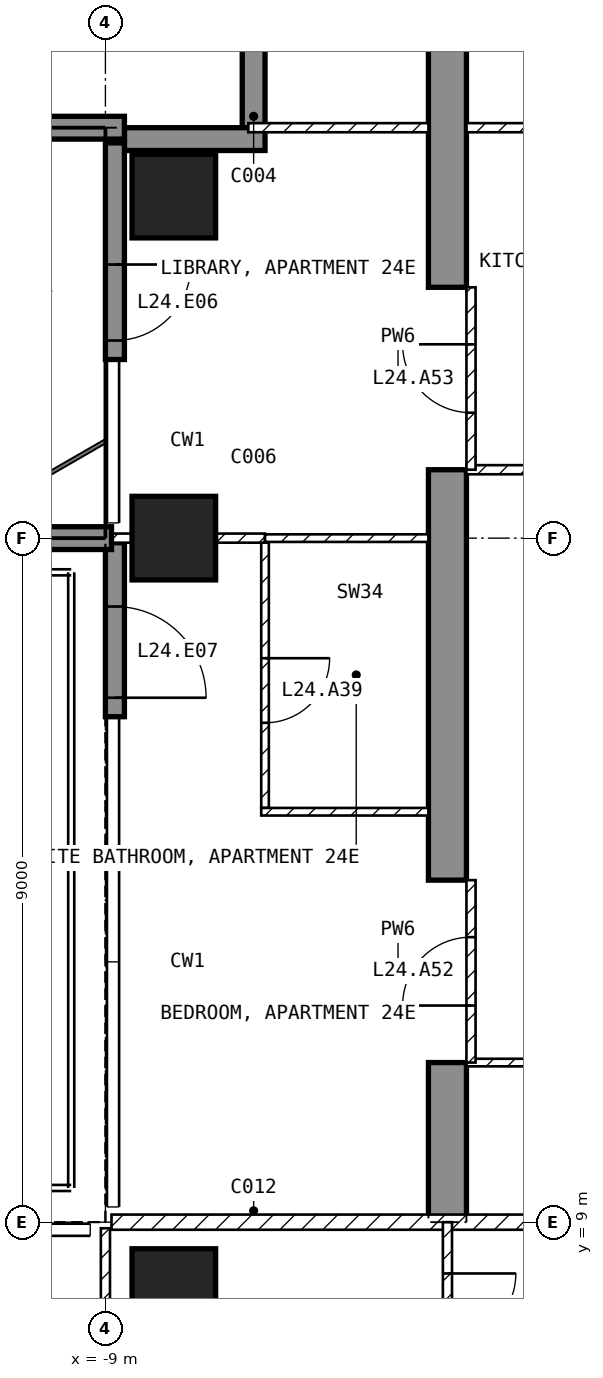
"""IFC4 building model, lengths in metres.
Left out: names, types, materials, properties, quantities, classifications, styles, units other than length and angle.
Written with IfcOpenShell. Run it as: python <this file> out.ifc"""

import sys

from ifc_helpers import new_model, si_unit, direction, frame, frame_2d, origin, origin_2d, place, context, subcontext, project, spatial, polyline, rectangle, outline, extrude, element, fill, save


model = new_model("IFC4")
c1 = context("Model", 3, precision=1e-05, world=origin(), true_north=direction((0.0, 1.0)))
c2 = subcontext(c1, "Body", "Model", "MODEL_VIEW")
j1 = project(units=[si_unit("LENGTHUNIT", "METRE"), si_unit("PLANEANGLEUNIT", "RADIAN")], contexts=[c1])
p1 = place(None, origin())
s1 = spatial("IfcSite", under=j1, at=p1, CompositionType="ELEMENT")
p2 = place(p1, origin())
s2 = spatial("IfcBuilding", under=s1, at=p2, CompositionType="ELEMENT")
p3 = place(p2, frame((0.0, 0.0, 105.9)))
s3 = spatial("IfcBuildingStorey", under=s2, at=p3, CompositionType="ELEMENT", Elevation=105.9)
for number, where, z_axis, x_axis in (
    (1, (-8.1, 8.1, -0.25), (0.0, 0.0, 1.0), (1.0, 0.0, 0.0)),
    (2, (-8.1, 18.0, -0.25), (0.0, 0.0, 1.0), (1.0, 0.0, 0.0)),
    (3, (-8.1, 22.5, -0.25), (0.0, 0.0, 1.0), (1.0, 0.0, 0.0)),
):
    element("IfcColumn", number, at=place(p3, frame(where, z_axis=z_axis, x_axis=x_axis)), inside=s3, PredefinedType="COLUMN", context=c2, shape_type="SweptSolid", body=[
        extrude(rectangle(XDim=1.1, YDim=1.1, at=origin_2d()), origin(), (0.0, 0.0, 1.0), 3.5),
    ])
p4 = place(p3, frame((-4.75, 9.0, -0.25), z_axis=(1.0, 0.0, 0.0), x_axis=(0.0, 1.0, 0.0)))
e4 = element("IfcWall", 4, at=p4, inside=s3, PredefinedType="SHEAR", context=c2, shape_type="SweptSolid", body=[
    extrude(outline(polyline([(0.0, 0.0), (2.1, 0.0), (2.1, 2.65), (4.5, 2.65), (4.5, 0.0), (9.9, 0.0), (9.9, 2.65), (12.3, 2.65), (12.3, 0.0), (16.55, 0.0), (16.55, 3.5), (0.0, 3.5), (0.0, 0.0)])), origin(), (0.0, 0.0, 1.0), 0.5),
])
p5 = place(p3, frame((-8.875, 23.2, 0.0), z_axis=(0.0, 0.0, 1.0), x_axis=(0.0, -1.0, 0.0)))
e5 = element("IfcWall", 5, at=p5, inside=s3, PredefinedType="SOLIDWALL", context=c2, shape_type="SweptSolid", body=[
    extrude(rectangle(XDim=2.85, YDim=0.25, at=frame_2d((1.425, 0.0))), origin(), (0.0, 0.0, 1.0), 3.25),
])
p6 = place(p5, frame((1.6, 0.0, 0.0)))
e6 = element("IfcOpeningElement", 6, at=p6, cuts=e5, PredefinedType="OPENING", context=c2, shape_type="SweptSolid", body=[
    extrude(rectangle(XDim=1.0, YDim=2.4, at=frame_2d((0.5, 1.2))), frame((0.0, 0.135, 0.0), z_axis=(0.0, -1.0, 0.0), x_axis=(1.0, 0.0, 0.0)), (0.0, 0.0, 1.0), 0.27),
])
p7 = place(p3, frame((-8.875, 17.94, 0.0), z_axis=(0.0, 0.0, 1.0), x_axis=(0.0, -1.0, 0.0)))
e7 = element("IfcWall", 7, at=p7, inside=s3, PredefinedType="SOLIDWALL", context=c2, shape_type="SweptSolid", body=[
    extrude(rectangle(XDim=2.29, YDim=0.25, at=frame_2d((1.145, 0.0))), origin(), (0.0, 0.0, 1.0), 3.25),
])
p8 = place(p7, frame((0.84, 0.0, 0.0)))
e8 = element("IfcOpeningElement", 8, at=p8, cuts=e7, PredefinedType="OPENING", context=c2, shape_type="SweptSolid", body=[
    extrude(rectangle(XDim=1.2, YDim=2.4, at=frame_2d((0.6, 1.2))), frame((0.0, 0.135, 0.0), z_axis=(0.0, -1.0, 0.0), x_axis=(1.0, 0.0, 0.0)), (0.0, 0.0, 1.0), 0.27),
])
p9 = place(p3, frame((-7.05, 25.2, 0.0), z_axis=(0.0, 0.0, 1.0), x_axis=(0.0, -1.0, 0.0)))
e9 = element("IfcWall", 9, at=p9, inside=s3, PredefinedType="SOLIDWALL", context=c2, shape_type="SweptSolid", body=[
    extrude(rectangle(XDim=1.8, YDim=0.3, at=frame_2d((0.9, 0.0))), origin(), (0.0, 0.0, 1.0), 3.25),
])
p10 = place(p3, frame((-6.9, 23.25, 0.0), z_axis=(0.0, 0.0, 1.0), x_axis=(-1.0, 0.0, 0.0)))
e10 = element("IfcWall", 10, at=p10, inside=s3, PredefinedType="SOLIDWALL", context=c2, shape_type="SweptSolid", body=[
    extrude(rectangle(XDim=1.85, YDim=0.3, at=frame_2d((0.925, 0.0))), origin(), (0.0, 0.0, 1.0), 3.25),
])
p11 = place(p3, frame((-8.92, 18.0, 0.0), z_axis=(0.0, 0.0, 1.0), x_axis=(-1.0, 0.0, 0.0)))
e11 = element("IfcWall", 11, at=p11, inside=s3, PredefinedType="SOLIDWALL", context=c2, shape_type="SweptSolid", body=[
    extrude(rectangle(XDim=2.82, YDim=0.3, at=frame_2d((1.41, 0.0))), origin(), (0.0, 0.0, 1.0), 3.25),
])
p12 = place(p3, frame((-8.75, 23.4, 0.0), z_axis=(0.0, 0.0, 1.0), x_axis=(-1.0, 0.0, 0.0)))
e12 = element("IfcWall", 12, at=p12, inside=s3, PredefinedType="SOLIDWALL", context=c2, shape_type="SweptSolid", body=[
    extrude(rectangle(XDim=2.95, YDim=0.3, at=frame_2d((1.475, 0.0))), origin(), (0.0, 0.0, 1.0), 3.25),
])
p13 = place(p3, frame((-8.92, 9.0, 0.0), z_axis=(0.0, 0.0, 1.0), x_axis=(1.0, 0.0, 0.0)))
e13 = element("IfcWall", 13, at=p13, inside=s3, PredefinedType="PARTITIONING", context=c2, shape_type="SweptSolid", body=[
    extrude(rectangle(XDim=17.84, YDim=0.2, at=frame_2d((8.92, 0.0))), origin(), (0.0, 0.0, 1.0), 3.25),
])
p14 = place(p13, frame((8.42, 0.0, 0.0)))
e14 = element("IfcOpeningElement", 14, at=p14, cuts=e13, PredefinedType="OPENING", context=c2, shape_type="SweptSolid", body=[
    extrude(rectangle(XDim=1.0, YDim=2.1, at=frame_2d((0.5, 1.05))), frame((0.0, 0.11, 0.0), z_axis=(0.0, -1.0, 0.0), x_axis=(1.0, 0.0, 0.0)), (0.0, 0.0, 1.0), 0.22),
])
p15 = place(p3, frame((-9.0, 8.92, 0.0), z_axis=(0.0, 0.0, 1.0), x_axis=(0.0, -1.0, 0.0)))
e15 = element("IfcWall", 15, at=p15, inside=s3, PredefinedType="PARTITIONING", context=c2, shape_type="SweptSolid", body=[
    extrude(rectangle(XDim=7.62, YDim=0.12, at=frame_2d((3.81, 0.0))), origin(), (0.0, 0.0, 1.0), 3.25),
])
p16 = place(p15, frame((2.62, 0.0, 0.0)))
e16 = element("IfcOpeningElement", 16, at=p16, cuts=e15, PredefinedType="OPENING", context=c2, shape_type="SweptSolid", body=[
    extrude(rectangle(XDim=0.9, YDim=2.1, at=frame_2d((0.45, 1.05))), frame((0.0, 0.07, 0.0), z_axis=(0.0, -1.0, 0.0), x_axis=(1.0, 0.0, 0.0)), (0.0, 0.0, 1.0), 0.14),
])
p17 = place(p3, frame((-4.5, 9.0, 0.0), z_axis=(0.0, 0.0, 1.0), x_axis=(0.0, -1.0, 0.0)))
e17 = element("IfcWall", 17, at=p17, inside=s3, PredefinedType="PARTITIONING", context=c2, shape_type="SweptSolid", body=[
    extrude(rectangle(XDim=2.25, YDim=0.12, at=frame_2d((1.125, 0.0))), origin(), (0.0, 0.0, 1.0), 3.25),
])
p18 = place(p17, frame((0.675, 0.0, 0.0)))
e18 = element("IfcOpeningElement", 18, at=p18, cuts=e17, PredefinedType="OPENING", context=c2, shape_type="SweptSolid", body=[
    extrude(rectangle(XDim=0.9, YDim=2.1, at=frame_2d((0.45, 1.05))), frame((0.0, 0.07, 0.0), z_axis=(0.0, -1.0, 0.0), x_axis=(1.0, 0.0, 0.0)), (0.0, 0.0, 1.0), 0.14),
])
p19 = place(p3, frame((-4.25, 11.1, 0.0), z_axis=(0.0, 0.0, 1.0), x_axis=(1.0, 0.0, 0.0)))
e19 = element("IfcWall", 19, at=p19, inside=s3, PredefinedType="PARTITIONING", context=c2, shape_type="SweptSolid", body=[
    extrude(rectangle(XDim=2.15, YDim=0.1, at=frame_2d((1.075, 0.0))), origin(), (0.0, 0.0, 1.0), 3.25),
])
p20 = place(p3, frame((-4.25, 18.9, 0.0), z_axis=(0.0, 0.0, 1.0), x_axis=(1.0, 0.0, 0.0)))
e20 = element("IfcWall", 20, at=p20, inside=s3, PredefinedType="PARTITIONING", context=c2, shape_type="SweptSolid", body=[
    extrude(rectangle(XDim=8.5, YDim=0.12, at=frame_2d((4.25, 0.0))), origin(), (0.0, 0.0, 1.0), 3.25),
])
p21 = place(p20, frame((5.675, 0.0, 0.0)))
e21 = element("IfcOpeningElement", 21, at=p21, cuts=e20, PredefinedType="OPENING", context=c2, shape_type="SweptSolid", body=[
    extrude(rectangle(XDim=0.9, YDim=2.1, at=frame_2d((0.45, 1.05))), frame((0.0, 0.07, 0.0), z_axis=(0.0, -1.0, 0.0), x_axis=(1.0, 0.0, 0.0)), (0.0, 0.0, 1.0), 0.14),
])
p22 = place(p3, frame((-4.25, 23.4, 0.0), z_axis=(0.0, 0.0, 1.0), x_axis=(1.0, 0.0, 0.0)))
e22 = element("IfcWall", 22, at=p22, inside=s3, PredefinedType="PARTITIONING", context=c2, shape_type="SweptSolid", body=[
    extrude(rectangle(XDim=8.5, YDim=0.12, at=frame_2d((4.25, 0.0))), origin(), (0.0, 0.0, 1.0), 3.25),
])
p23 = place(p22, frame((5.675, 0.0, 0.0)))
e23 = element("IfcOpeningElement", 23, at=p23, cuts=e22, PredefinedType="OPENING", context=c2, shape_type="SweptSolid", body=[
    extrude(rectangle(XDim=0.9, YDim=2.1, at=frame_2d((0.45, 1.05))), frame((0.0, 0.07, 0.0), z_axis=(0.0, -1.0, 0.0), x_axis=(1.0, 0.0, 0.0)), (0.0, 0.0, 1.0), 0.14),
])
p24 = place(p3, frame((-6.9, 17.94, 0.0), z_axis=(0.0, 0.0, 1.0), x_axis=(0.0, -1.0, 0.0)))
e24 = element("IfcWall", 24, at=p24, inside=s3, PredefinedType="PARTITIONING", context=c2, shape_type="SweptSolid", body=[
    extrude(rectangle(XDim=3.49, YDim=0.1, at=frame_2d((1.745, 0.0))), origin(), (0.0, 0.0, 1.0), 3.25),
])
p25 = place(p24, frame((1.52, 0.0, 0.0)))
e25 = element("IfcOpeningElement", 25, at=p25, cuts=e24, PredefinedType="OPENING", context=c2, shape_type="SweptSolid", body=[
    extrude(rectangle(XDim=0.85, YDim=2.1, at=frame_2d((0.425, 1.05))), frame((0.0, 0.06, 0.0), z_axis=(0.0, -1.0, 0.0), x_axis=(1.0, 0.0, 0.0)), (0.0, 0.0, 1.0), 0.12),
])
p26 = place(p3, frame((-6.95, 14.4, 0.0), z_axis=(0.0, 0.0, 1.0), x_axis=(1.0, 0.0, 0.0)))
e26 = element("IfcWall", 26, at=p26, inside=s3, PredefinedType="PARTITIONING", context=c2, shape_type="SweptSolid", body=[
    extrude(rectangle(XDim=2.2, YDim=0.1, at=frame_2d((1.1, 0.0))), origin(), (0.0, 0.0, 1.0), 3.25),
])
p27 = place(p3, frame((-8.92, 18.0, 0.0), z_axis=(0.0, 0.0, 1.0), x_axis=(1.0, 0.0, 0.0)))
e27 = element("IfcWall", 27, at=p27, inside=s3, PredefinedType="PARTITIONING", context=c2, shape_type="SweptSolid", body=[
    extrude(rectangle(XDim=2.02, YDim=0.12, at=frame_2d((1.01, 0.0))), origin(), (0.0, 0.0, 1.0), 2.414),
])
p28 = place(p3, frame((-6.9, 18.0, 0.0), z_axis=(0.0, 0.0, 1.0), x_axis=(1.0, 0.0, 0.0)))
e28 = element("IfcWall", 28, at=p28, inside=s3, PredefinedType="PARTITIONING", context=c2, shape_type="SweptSolid", body=[
    extrude(rectangle(XDim=2.15, YDim=0.1, at=frame_2d((1.075, 0.0))), origin(), (0.0, 0.0, 1.0), 2.414),
])
p29 = place(p3, frame((-7.12, 23.4, 0.0), z_axis=(0.0, 0.0, 1.0), x_axis=(1.0, 0.0, 0.0)))
e29 = element("IfcWall", 29, at=p29, inside=s3, PredefinedType="PARTITIONING", context=c2, shape_type="SweptSolid", body=[
    extrude(rectangle(XDim=2.37, YDim=0.12, at=frame_2d((1.185, 0.0))), origin(), (0.0, 0.0, 1.0), 3.25),
])
p30 = place(p3, frame((-4.19, 11.1, 0.0), z_axis=(0.0, 0.0, 1.0), x_axis=(0.0, 1.0, 0.0)))
e30 = element("IfcWall", 30, at=p30, inside=s3, PredefinedType="PARTITIONING", context=c2, shape_type="SweptSolid", body=[
    extrude(rectangle(XDim=2.4, YDim=0.12, at=frame_2d((1.2, 0.0))), origin(), (0.0, 0.0, 1.0), 2.4),
])
p31 = place(p30, frame((0.75, 0.0, 0.0)))
e31 = element("IfcOpeningElement", 31, at=p31, cuts=e30, PredefinedType="OPENING", context=c2, shape_type="SweptSolid", body=[
    extrude(rectangle(XDim=0.9, YDim=2.1, at=frame_2d((0.45, 1.05))), frame((0.0, 0.07, 0.0), z_axis=(0.0, -1.0, 0.0), x_axis=(1.0, 0.0, 0.0)), (0.0, 0.0, 1.0), 0.14),
])
p32 = place(p3, frame((-4.19, 18.9, 0.0), z_axis=(0.0, 0.0, 1.0), x_axis=(0.0, 1.0, 0.0)))
e32 = element("IfcWall", 32, at=p32, inside=s3, PredefinedType="PARTITIONING", context=c2, shape_type="SweptSolid", body=[
    extrude(rectangle(XDim=2.4, YDim=0.12, at=frame_2d((1.2, 0.0))), origin(), (0.0, 0.0, 1.0), 2.4),
])
p33 = place(p32, frame((0.75, 0.0, 0.0)))
e33 = element("IfcOpeningElement", 33, at=p33, cuts=e32, PredefinedType="OPENING", context=c2, shape_type="SweptSolid", body=[
    extrude(rectangle(XDim=0.9, YDim=2.1, at=frame_2d((0.45, 1.05))), frame((0.0, 0.07, 0.0), z_axis=(0.0, -1.0, 0.0), x_axis=(1.0, 0.0, 0.0)), (0.0, 0.0, 1.0), 0.14),
])
p34 = place(p6, origin())
e34 = element("IfcDoor", 34, at=p34, inside=s3, OperationType="SINGLE_SWING_LEFT", PredefinedType="DOOR", context=c2, shape_type="SweptSolid", body=[
    extrude(rectangle(XDim=1.0, YDim=2.4, at=frame_2d((0.5, 1.2))), frame((0.0, 0.025, 0.0), z_axis=(0.0, -1.0, 0.0), x_axis=(1.0, 0.0, 0.0)), (0.0, 0.0, 1.0), 0.05),
])
fill(e6, e34)
p35 = place(p8, origin())
e35 = element("IfcDoor", 35, at=p35, inside=s3, OperationType="SINGLE_SWING_RIGHT", PredefinedType="DOOR", context=c2, shape_type="SweptSolid", body=[
    extrude(rectangle(XDim=1.2, YDim=2.4, at=frame_2d((0.6, 1.2))), frame((0.0, 0.025, 0.0), z_axis=(0.0, -1.0, 0.0), x_axis=(1.0, 0.0, 0.0)), (0.0, 0.0, 1.0), 0.05),
])
fill(e8, e35)
p36 = place(p18, origin())
e36 = element("IfcDoor", 36, at=p36, inside=s3, OperationType="SINGLE_SWING_LEFT", PredefinedType="DOOR", context=c2, shape_type="SweptSolid", body=[
    extrude(rectangle(XDim=0.9, YDim=2.1, at=frame_2d((0.45, 1.05))), frame((0.0, 0.025, 0.0), z_axis=(0.0, -1.0, 0.0), x_axis=(1.0, 0.0, 0.0)), (0.0, 0.0, 1.0), 0.05),
])
fill(e18, e36)
p37 = place(p25, origin())
e37 = element("IfcDoor", 37, at=p37, inside=s3, OperationType="SINGLE_SWING_LEFT", PredefinedType="DOOR", context=c2, shape_type="SweptSolid", body=[
    extrude(rectangle(XDim=0.85, YDim=2.1, at=frame_2d((0.425, 1.05))), frame((0.0, 0.025, 0.0), z_axis=(0.0, -1.0, 0.0), x_axis=(1.0, 0.0, 0.0)), (0.0, 0.0, 1.0), 0.05),
])
fill(e25, e37)
p38 = place(p31, origin())
e38 = element("IfcDoor", 38, at=p38, inside=s3, OperationType="SINGLE_SWING_LEFT", PredefinedType="DOOR", context=c2, shape_type="SweptSolid", body=[
    extrude(rectangle(XDim=0.9, YDim=2.1, at=frame_2d((0.45, 1.05))), frame((0.0, 0.025, 0.0), z_axis=(0.0, -1.0, 0.0), x_axis=(1.0, 0.0, 0.0)), (0.0, 0.0, 1.0), 0.05),
])
fill(e31, e38)
p39 = place(p33, origin())
e39 = element("IfcDoor", 39, at=p39, inside=s3, OperationType="SINGLE_SWING_RIGHT", PredefinedType="DOOR", context=c2, shape_type="SweptSolid", body=[
    extrude(rectangle(XDim=0.9, YDim=2.1, at=frame_2d((0.45, 1.05))), frame((0.0, 0.025, 0.0), z_axis=(0.0, -1.0, 0.0), x_axis=(1.0, 0.0, 0.0)), (0.0, 0.0, 1.0), 0.05),
])
fill(e33, e39)
save(model, sys.argv[1])
